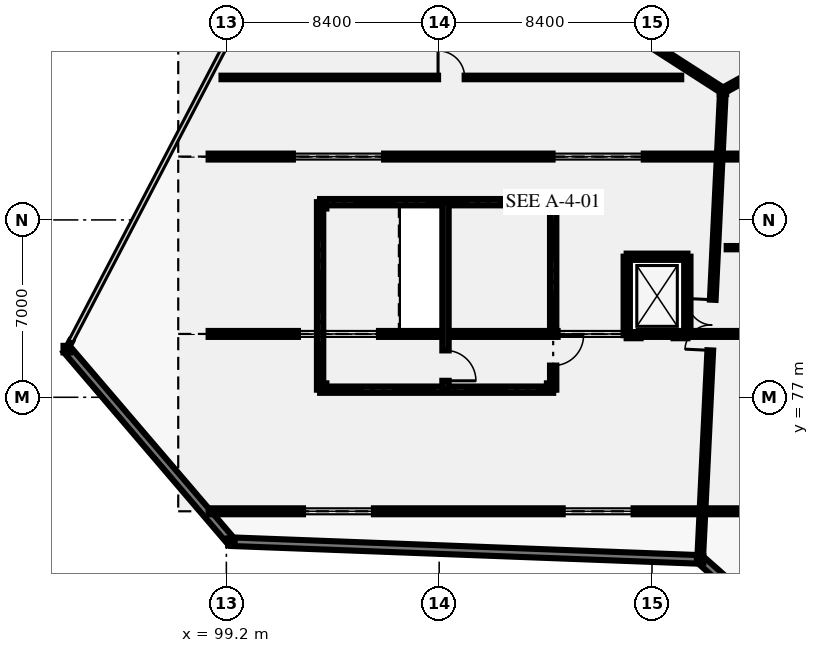
"""IFC4 building model, lengths in metres.
Left out: names, types, materials, properties, quantities, classifications, styles, units other than length and angle.
Written with IfcOpenShell. Run it as: python <this file> out.ifc"""

import sys

from ifc_helpers import new_model, si_unit, direction, frame, frame_2d, origin, origin_2d, place, context, subcontext, project, spatial, rectangle, i_section, extrude, element, fill, save


model = new_model("IFC4")
c1 = context("Model", 3, precision=1e-05, world=origin(), true_north=direction((0.0, 1.0)))
c2 = subcontext(c1, "Body", "Model", "MODEL_VIEW")
j1 = project(units=[si_unit("LENGTHUNIT", "METRE"), si_unit("PLANEANGLEUNIT", "RADIAN")], contexts=[c1])
p1 = place(None, origin())
s1 = spatial("IfcSite", under=j1, at=p1, CompositionType="ELEMENT")
p2 = place(p1, origin())
s2 = spatial("IfcBuilding", under=s1, at=p2, CompositionType="ELEMENT")
p3 = place(p2, frame((0.0, 0.0, 28.8)))
s3 = spatial("IfcBuildingStorey", under=s2, at=p3, CompositionType="ELEMENT", Elevation=28.8)
for number, where, z_axis, x_axis in (
    (1, (92.9, 78.9, 0.0), (0.0, 0.0, 1.0), (1.0, 0.0, 0.0)),
    (2, (99.4, 71.3, 0.0), (0.0, 0.0, 1.0), (1.0, 0.0, 0.0)),
    (3, (117.9, 70.6, 0.0), (0.0, 0.0, 1.0), (1.0, 0.0, 0.0)),
    (4, (118.8, 89.1, 0.0), (0.0, 0.0, 1.0), (1.0, 0.0, 0.0)),
    (5, (103.02, 77.42, 0.0), (0.0, 0.0, 1.0), (1.0, 0.0, 0.0)),
    (6, (111.98, 77.42, 0.0), (0.0, 0.0, 1.0), (1.0, 0.0, 0.0)),
    (7, (111.98, 84.58, 0.0), (0.0, 0.0, 1.0), (1.0, 0.0, 0.0)),
    (8, (103.02, 84.58, 0.0), (0.0, 0.0, 1.0), (1.0, 0.0, 0.0)),
):
    element("IfcColumn", number, at=place(p3, frame(where, z_axis=z_axis, x_axis=x_axis)), inside=s3, PredefinedType="COLUMN", context=c2, shape_type="SweptSolid", body=[
        extrude(i_section(OverallWidth=0.256, OverallDepth=0.26, WebThickness=0.01, FlangeThickness=0.017, FilletRadius=0.013, at=origin_2d()), origin(), (0.0, 0.0, 1.0), 6.6),
    ])
p4 = place(p3, frame((117.84, 70.602, 0.0), z_axis=(0.0, 0.0, 1.0), x_axis=(-0.999284381651, 0.037824920194, 0.0)))
e9 = element("IfcWall", 9, at=p4, inside=s3, PredefinedType="SOLIDWALL", context=c2, shape_type="SweptSolid", body=[
    extrude(rectangle(XDim=18.453, YDim=0.34, at=frame_2d((9.227, 0.0))), origin(), (0.0, 0.0, 1.0), 5.42),
])
p5 = place(p3, frame((92.919, 78.937, 0.0), z_axis=(0.0, 0.0, 1.0), x_axis=(0.464243799771, 0.885707454171, 0.0)))
e10 = element("IfcWall", 10, at=p5, inside=s3, PredefinedType="SOLIDWALL", context=c2, shape_type="SweptSolid", body=[
    extrude(rectangle(XDim=0.308, YDim=0.095, at=frame_2d((0.154, 0.0))), origin(), (0.0, 0.0, 1.0), 5.42),
])
p6 = place(p3, frame((99.4, 71.3, 0.0), z_axis=(0.0, 0.0, 1.0), x_axis=(-0.649974737731, 0.75995581471, 0.0)))
e11 = element("IfcWall", 11, at=p6, inside=s3, PredefinedType="SOLIDWALL", context=c2, shape_type="SweptSolid", body=[
    extrude(rectangle(XDim=10.0, YDim=0.34, at=frame_2d((5.0, 0.0))), origin(), (0.0, 0.0, 1.0), 5.42),
])
p7 = place(p3, frame((125.5, 63.9, 0.0), z_axis=(0.0, 0.0, 1.0), x_axis=(-0.750131359252, 0.661288850554, 0.0)))
e12 = element("IfcWall", 12, at=p7, inside=s3, PredefinedType="SOLIDWALL", context=c2, shape_type="SweptSolid", body=[
    extrude(rectangle(XDim=10.072, YDim=0.34, at=frame_2d((5.036, 0.0))), origin(), (0.0, 0.0, 1.0), 5.42),
])
p8 = place(p3, frame((139.5, 72.5, 6.25), z_axis=(0.0, 0.0, 1.0), x_axis=(-1.0, 0.0, 0.0)))
e13 = element("IfcWall", 13, at=p8, inside=s3, PredefinedType="SOLIDWALL", context=c2, shape_type="SweptSolid", body=[
    extrude(rectangle(XDim=41.0, YDim=0.235, at=frame_2d((20.5, 0.0))), origin(), (0.0, 0.0, 1.0), 3.73),
])
p9 = place(p8, frame((3.725, 0.0, 0.25)))
e14 = element("IfcOpeningElement", 14, at=p9, cuts=e13, PredefinedType="OPENING", context=c2, shape_type="SweptSolid", body=[
    extrude(rectangle(XDim=2.8, YDim=2.2, at=frame_2d((1.4, 1.1))), frame((0.0, 0.127, 0.0), z_axis=(0.0, -1.0, 0.0), x_axis=(1.0, 0.0, 0.0)), (0.0, 0.0, 1.0), 0.255),
])
p10 = place(p8, frame((13.975, 0.0, 0.25)))
e15 = element("IfcOpeningElement", 15, at=p10, cuts=e13, PredefinedType="OPENING", context=c2, shape_type="SweptSolid", body=[
    extrude(rectangle(XDim=2.8, YDim=2.2, at=frame_2d((1.4, 1.1))), frame((0.0, 0.127, 0.0), z_axis=(0.0, -1.0, 0.0), x_axis=(1.0, 0.0, 0.0)), (0.0, 0.0, 1.0), 0.255),
])
p11 = place(p8, frame((24.225, 0.0, 0.25)))
e16 = element("IfcOpeningElement", 16, at=p11, cuts=e13, PredefinedType="OPENING", context=c2, shape_type="SweptSolid", body=[
    extrude(rectangle(XDim=2.8, YDim=2.2, at=frame_2d((1.4, 1.1))), frame((0.0, 0.127, 0.0), z_axis=(0.0, -1.0, 0.0), x_axis=(1.0, 0.0, 0.0)), (0.0, 0.0, 1.0), 0.255),
])
p12 = place(p8, frame((34.475, 0.0, 0.25)))
e17 = element("IfcOpeningElement", 17, at=p12, cuts=e13, PredefinedType="OPENING", context=c2, shape_type="SweptSolid", body=[
    extrude(rectangle(XDim=2.8, YDim=2.2, at=frame_2d((1.4, 1.1))), frame((0.0, 0.127, 0.0), z_axis=(0.0, -1.0, 0.0), x_axis=(1.0, 0.0, 0.0)), (0.0, 0.0, 1.0), 0.255),
])
p13 = place(p3, frame((139.5, 79.5, 6.25), z_axis=(0.0, 0.0, 1.0), x_axis=(-1.0, 0.0, 0.0)))
e18 = element("IfcWall", 18, at=p13, inside=s3, PredefinedType="SOLIDWALL", context=c2, shape_type="SweptSolid", body=[
    extrude(rectangle(XDim=41.0, YDim=0.235, at=frame_2d((20.5, 0.0))), origin(), (0.0, 0.0, 1.0), 5.13),
])
p14 = place(p13, frame((4.675, 0.0, 0.25)))
e19 = element("IfcOpeningElement", 19, at=p14, cuts=e18, PredefinedType="OPENING", context=c2, shape_type="SweptSolid", body=[
    extrude(rectangle(XDim=3.2, YDim=2.4, at=frame_2d((1.6, 1.2))), frame((0.0, 0.127, 0.0), z_axis=(0.0, -1.0, 0.0), x_axis=(1.0, 0.0, 0.0)), (0.0, 0.0, 1.0), 0.255),
])
p15 = place(p13, frame((13.775, 0.0, 0.25)))
e20 = element("IfcOpeningElement", 20, at=p15, cuts=e18, PredefinedType="OPENING", context=c2, shape_type="SweptSolid", body=[
    extrude(rectangle(XDim=3.2, YDim=2.4, at=frame_2d((1.6, 1.2))), frame((0.0, 0.127, 0.0), z_axis=(0.0, -1.0, 0.0), x_axis=(1.0, 0.0, 0.0)), (0.0, 0.0, 1.0), 0.255),
])
p16 = place(p13, frame((24.025, 0.0, 0.25)))
e21 = element("IfcOpeningElement", 21, at=p16, cuts=e18, PredefinedType="OPENING", context=c2, shape_type="SweptSolid", body=[
    extrude(rectangle(XDim=3.2, YDim=2.4, at=frame_2d((1.6, 1.2))), frame((0.0, 0.127, 0.0), z_axis=(0.0, -1.0, 0.0), x_axis=(1.0, 0.0, 0.0)), (0.0, 0.0, 1.0), 0.255),
])
p17 = place(p13, frame((34.275, 0.0, 0.25)))
e22 = element("IfcOpeningElement", 22, at=p17, cuts=e18, PredefinedType="OPENING", context=c2, shape_type="SweptSolid", body=[
    extrude(rectangle(XDim=3.2, YDim=2.4, at=frame_2d((1.6, 1.2))), frame((0.0, 0.127, 0.0), z_axis=(0.0, -1.0, 0.0), x_axis=(1.0, 0.0, 0.0)), (0.0, 0.0, 1.0), 0.255),
])
p18 = place(p3, frame((139.5, 86.5, 6.25), z_axis=(0.0, 0.0, 1.0), x_axis=(-1.0, 0.0, 0.0)))
e23 = element("IfcWall", 23, at=p18, inside=s3, PredefinedType="SOLIDWALL", context=c2, shape_type="SweptSolid", body=[
    extrude(rectangle(XDim=41.0, YDim=0.235, at=frame_2d((20.5, 0.0))), origin(), (0.0, 0.0, 1.0), 5.13),
])
p19 = place(p18, frame((4.475, 0.0, 0.25)))
e24 = element("IfcOpeningElement", 24, at=p19, cuts=e23, PredefinedType="OPENING", context=c2, shape_type="SweptSolid", body=[
    extrude(rectangle(XDim=3.6, YDim=2.4, at=frame_2d((1.8, 1.2))), frame((0.0, 0.127, 0.0), z_axis=(0.0, -1.0, 0.0), x_axis=(1.0, 0.0, 0.0)), (0.0, 0.0, 1.0), 0.255),
])
p20 = place(p18, frame((13.575, 0.0, 0.25)))
e25 = element("IfcOpeningElement", 25, at=p20, cuts=e23, PredefinedType="OPENING", context=c2, shape_type="SweptSolid", body=[
    extrude(rectangle(XDim=3.6, YDim=2.4, at=frame_2d((1.8, 1.2))), frame((0.0, 0.127, 0.0), z_axis=(0.0, -1.0, 0.0), x_axis=(1.0, 0.0, 0.0)), (0.0, 0.0, 1.0), 0.255),
])
p21 = place(p18, frame((23.825, 0.0, 0.25)))
e26 = element("IfcOpeningElement", 26, at=p21, cuts=e23, PredefinedType="OPENING", context=c2, shape_type="SweptSolid", body=[
    extrude(rectangle(XDim=3.6, YDim=2.4, at=frame_2d((1.8, 1.2))), frame((0.0, 0.127, 0.0), z_axis=(0.0, -1.0, 0.0), x_axis=(1.0, 0.0, 0.0)), (0.0, 0.0, 1.0), 0.255),
])
p22 = place(p18, frame((34.075, 0.0, 0.25)))
e27 = element("IfcOpeningElement", 27, at=p22, cuts=e23, PredefinedType="OPENING", context=c2, shape_type="SweptSolid", body=[
    extrude(rectangle(XDim=3.6, YDim=2.4, at=frame_2d((1.8, 1.2))), frame((0.0, 0.127, 0.0), z_axis=(0.0, -1.0, 0.0), x_axis=(1.0, 0.0, 0.0)), (0.0, 0.0, 1.0), 0.255),
])
p23 = place(p3, frame((117.9, 70.6, 0.0), z_axis=(0.0, 0.0, 1.0), x_axis=(0.048599072515, 0.998818366947, 0.0)))
e28 = element("IfcWall", 28, at=p23, inside=s3, PredefinedType="SOLIDWALL", context=c2, shape_type="SweptSolid", body=[
    extrude(rectangle(XDim=18.522, YDim=0.225, at=frame_2d((9.261, 0.0))), origin(), (0.0, 0.0, 1.0), 5.82),
])
p24 = place(p23, frame((8.261, 0.0, 0.0)))
e29 = element("IfcOpeningElement", 29, at=p24, cuts=e28, PredefinedType="OPENING", context=c2, shape_type="SweptSolid", body=[
    extrude(rectangle(XDim=2.0, YDim=2.5, at=frame_2d((1.0, 1.25))), frame((0.0, 0.123, 0.0), z_axis=(0.0, -1.0, 0.0), x_axis=(1.0, 0.0, 0.0)), (0.0, 0.0, 1.0), 0.245),
])
p25 = place(p3, frame((118.8, 89.1, 0.0), z_axis=(0.0, 0.0, 1.0), x_axis=(-0.841183241423, 0.540750177392, 0.0)))
e30 = element("IfcWall", 30, at=p25, inside=s3, PredefinedType="SOLIDWALL", context=c2, shape_type="SweptSolid", body=[
    extrude(rectangle(XDim=18.308, YDim=0.225, at=frame_2d((9.154, 0.0))), origin(), (0.0, 0.0, 1.0), 5.82),
])
p26 = place(p25, frame((8.229, 0.0, 0.0)))
e31 = element("IfcOpeningElement", 31, at=p26, cuts=e30, PredefinedType="OPENING", context=c2, shape_type="SweptSolid", body=[
    extrude(rectangle(XDim=1.85, YDim=2.4, at=frame_2d((0.925, 1.2))), frame((0.0, 0.123, 0.0), z_axis=(0.0, -1.0, 0.0), x_axis=(1.0, 0.0, 0.0)), (0.0, 0.0, 1.0), 0.245),
])
p27 = place(p3, frame((134.9, 98.0, 0.0), z_axis=(0.0, 0.0, 1.0), x_axis=(-0.875181353329, -0.483794996652, 0.0)))
e32 = element("IfcWall", 32, at=p27, inside=s3, PredefinedType="SOLIDWALL", context=c2, shape_type="SweptSolid", body=[
    extrude(rectangle(XDim=18.396, YDim=0.225, at=frame_2d((9.198, 0.0))), origin(), (0.0, 0.0, 1.0), 5.82),
])
p28 = place(p27, frame((8.098, 0.0, 0.0)))
e33 = element("IfcOpeningElement", 33, at=p28, cuts=e32, PredefinedType="OPENING", context=c2, shape_type="SweptSolid", body=[
    extrude(rectangle(XDim=2.2, YDim=2.6, at=frame_2d((1.1, 1.3))), frame((0.0, 0.123, 0.0), z_axis=(0.0, -1.0, 0.0), x_axis=(1.0, 0.0, 0.0)), (0.0, 0.0, 1.0), 0.245),
])
p29 = place(p3, frame((99.009, 89.623, 0.0), z_axis=(0.0, 0.0, 1.0), x_axis=(1.0, 0.0, 0.0)))
e34 = element("IfcWall", 34, at=p29, inside=s3, PredefinedType="PARTITIONING", context=c2, shape_type="SweptSolid", body=[
    extrude(rectangle(XDim=18.145, YDim=0.14, at=frame_2d((9.073, 0.0))), origin(), (0.0, 0.0, 1.0), 5.12),
])
p30 = place(p29, frame((8.547, 0.0, 0.0)))
e35 = element("IfcOpeningElement", 35, at=p30, cuts=e34, PredefinedType="OPENING", context=c2, shape_type="SweptSolid", body=[
    extrude(rectangle(XDim=1.05, YDim=2.2, at=frame_2d((0.525, 1.1))), frame((0.0, 0.08, 0.0), z_axis=(0.0, -1.0, 0.0), x_axis=(1.0, 0.0, 0.0)), (0.0, 0.0, 1.0), 0.16),
])
p31 = place(p3, frame((118.949, 82.905, 0.0), z_axis=(0.0, 0.0, 1.0), x_axis=(1.0, 0.0, 0.0)))
e36 = element("IfcWall", 36, at=p31, inside=s3, PredefinedType="PARTITIONING", context=c2, shape_type="SweptSolid", body=[
    extrude(rectangle(XDim=3.251, YDim=0.13, at=frame_2d((1.625, 0.0))), origin(), (0.0, 0.0, 1.0), 5.12),
])
p32 = place(p31, frame((1.136, 0.0, 0.0)))
e37 = element("IfcOpeningElement", 37, at=p32, cuts=e36, PredefinedType="OPENING", context=c2, shape_type="SweptSolid", body=[
    extrude(rectangle(XDim=0.98, YDim=2.15, at=frame_2d((0.49, 1.075))), frame((0.0, 0.075, 0.0), z_axis=(0.0, -1.0, 0.0), x_axis=(1.0, 0.0, 0.0)), (0.0, 0.0, 1.0), 0.15),
])
p33 = place(p3, frame((102.9, 77.3, 0.0), z_axis=(0.0, 0.0, 1.0), x_axis=(0.0, 1.0, 0.0)))
e38 = element("IfcWall", 38, at=p33, inside=s3, PredefinedType="SHEAR", context=c2, shape_type="SweptSolid", body=[
    extrude(rectangle(XDim=7.4, YDim=0.25, at=frame_2d((3.7, 0.0))), origin(), (0.0, 0.0, 1.0), 6.36),
])
for number, where, z_axis, x_axis in (
    (39, (102.9, 84.7, 0.0), (0.0, 0.0, 1.0), (1.0, 0.0, 0.0)),
    (40, (112.1, 77.3, 0.0), (0.0, 0.0, 1.0), (-1.0, 0.0, 0.0)),
):
    element("IfcWall", number, at=place(p3, frame(where, z_axis=z_axis, x_axis=x_axis)), inside=s3, PredefinedType="SHEAR", context=c2, shape_type="SweptSolid", body=[
        extrude(rectangle(XDim=9.2, YDim=0.25, at=frame_2d((4.6, 0.0))), origin(), (0.0, 0.0, 1.0), 6.36),
    ])
p34 = place(p3, frame((112.1, 84.7, 0.0), z_axis=(0.0, 0.0, 1.0), x_axis=(0.0, -1.0, 0.0)))
e41 = element("IfcWall", 41, at=p34, inside=s3, PredefinedType="SHEAR", context=c2, shape_type="SweptSolid", body=[
    extrude(rectangle(XDim=7.4, YDim=0.25, at=frame_2d((3.7, 0.0))), origin(), (0.0, 0.0, 1.0), 6.36),
])
p35 = place(p34, frame((5.25, 0.0, 0.0)))
e42 = element("IfcOpeningElement", 42, at=p35, cuts=e41, PredefinedType="OPENING", context=c2, shape_type="SweptSolid", body=[
    extrude(rectangle(XDim=1.2, YDim=2.2, at=frame_2d((0.6, 1.1))), frame((0.0, 0.135, 0.0), z_axis=(0.0, -1.0, 0.0), x_axis=(1.0, 0.0, 0.0)), (0.0, 0.0, 1.0), 0.27),
])
p36 = place(p3, frame((107.85, 84.7, 0.0), z_axis=(0.0, 0.0, 1.0), x_axis=(0.0, -1.0, 0.0)))
e43 = element("IfcWall", 43, at=p36, inside=s3, PredefinedType="SHEAR", context=c2, shape_type="SweptSolid", body=[
    extrude(rectangle(XDim=7.4, YDim=0.25, at=frame_2d((3.7, 0.0))), origin(), (0.0, 0.0, 1.0), 6.36),
])
p37 = place(p36, frame((5.85, 0.0, 0.0)))
e44 = element("IfcOpeningElement", 44, at=p37, cuts=e43, PredefinedType="OPENING", context=c2, shape_type="SweptSolid", body=[
    extrude(rectangle(XDim=1.2, YDim=2.2, at=frame_2d((0.6, 1.1))), frame((0.0, 0.135, 0.0), z_axis=(0.0, -1.0, 0.0), x_axis=(1.0, 0.0, 0.0)), (0.0, 0.0, 1.0), 0.27),
])
p38 = place(p3, frame((115.0, 82.55, 0.0), z_axis=(0.0, 0.0, 1.0), x_axis=(1.0, 0.0, 0.0)))
e45 = element("IfcWall", 45, at=p38, inside=s3, PredefinedType="SHEAR", context=c2, shape_type="SweptSolid", body=[
    extrude(rectangle(XDim=2.4, YDim=0.24, at=frame_2d((1.2, 0.0))), origin(), (0.0, 0.0, 1.0), 6.2),
])
for number, where, z_axis, x_axis in (
    (46, (117.4, 82.55, 0.0), (0.0, 0.0, 1.0), (0.0, -1.0, 0.0)),
    (47, (115.0, 79.45, 0.0), (0.0, 0.0, 1.0), (0.0, 1.0, 0.0)),
):
    element("IfcWall", number, at=place(p3, frame(where, z_axis=z_axis, x_axis=x_axis)), inside=s3, PredefinedType="SHEAR", context=c2, shape_type="SweptSolid", body=[
        extrude(rectangle(XDim=3.1, YDim=0.24, at=frame_2d((1.55, 0.0))), origin(), (0.0, 0.0, 1.0), 6.2),
    ])
p39 = place(p3, frame((117.4, 79.45, 0.0), z_axis=(0.0, 0.0, 1.0), x_axis=(-1.0, 0.0, 0.0)))
e48 = element("IfcWall", 48, at=p39, inside=s3, PredefinedType="SHEAR", context=c2, shape_type="SweptSolid", body=[
    extrude(rectangle(XDim=2.4, YDim=0.24, at=frame_2d((1.2, 0.0))), origin(), (0.0, 0.0, 1.0), 6.2),
])
p40 = place(p39, frame((0.55, 0.0, 0.0)))
e49 = element("IfcOpeningElement", 49, at=p40, cuts=e48, PredefinedType="OPENING", context=c2, shape_type="SweptSolid", body=[
    extrude(rectangle(XDim=1.3, YDim=2.25, at=frame_2d((0.65, 1.125))), frame((0.0, 0.13, 0.0), z_axis=(0.0, -1.0, 0.0), x_axis=(1.0, 0.0, 0.0)), (0.0, 0.0, 1.0), 0.26),
])
p41 = place(p11, origin())
e50 = element("IfcWindow", 50, at=p41, inside=s3, PartitioningType="SINGLE_PANEL", PredefinedType="SKYLIGHT", context=c2, shape_type="SweptSolid", body=[
    extrude(rectangle(XDim=2.8, YDim=2.2, at=frame_2d((1.4, 1.1))), frame((0.0, 0.03, 0.0), z_axis=(0.0, -1.0, 0.0), x_axis=(1.0, 0.0, 0.0)), (0.0, 0.0, 1.0), 0.06),
])
fill(e16, e50)
p42 = place(p12, origin())
e51 = element("IfcWindow", 51, at=p42, inside=s3, PartitioningType="SINGLE_PANEL", PredefinedType="SKYLIGHT", context=c2, shape_type="SweptSolid", body=[
    extrude(rectangle(XDim=2.8, YDim=2.2, at=frame_2d((1.4, 1.1))), frame((0.0, 0.03, 0.0), z_axis=(0.0, -1.0, 0.0), x_axis=(1.0, 0.0, 0.0)), (0.0, 0.0, 1.0), 0.06),
])
fill(e17, e51)
p43 = place(p16, origin())
e52 = element("IfcWindow", 52, at=p43, inside=s3, PartitioningType="SINGLE_PANEL", PredefinedType="SKYLIGHT", context=c2, shape_type="SweptSolid", body=[
    extrude(rectangle(XDim=3.2, YDim=2.4, at=frame_2d((1.6, 1.2))), frame((0.0, 0.03, 0.0), z_axis=(0.0, -1.0, 0.0), x_axis=(1.0, 0.0, 0.0)), (0.0, 0.0, 1.0), 0.06),
])
fill(e21, e52)
p44 = place(p17, origin())
e53 = element("IfcWindow", 53, at=p44, inside=s3, PartitioningType="SINGLE_PANEL", PredefinedType="SKYLIGHT", context=c2, shape_type="SweptSolid", body=[
    extrude(rectangle(XDim=3.2, YDim=2.4, at=frame_2d((1.6, 1.2))), frame((0.0, 0.03, 0.0), z_axis=(0.0, -1.0, 0.0), x_axis=(1.0, 0.0, 0.0)), (0.0, 0.0, 1.0), 0.06),
])
fill(e22, e53)
p45 = place(p21, origin())
e54 = element("IfcWindow", 54, at=p45, inside=s3, PartitioningType="SINGLE_PANEL", PredefinedType="SKYLIGHT", context=c2, shape_type="SweptSolid", body=[
    extrude(rectangle(XDim=3.6, YDim=2.4, at=frame_2d((1.8, 1.2))), frame((0.0, 0.03, 0.0), z_axis=(0.0, -1.0, 0.0), x_axis=(1.0, 0.0, 0.0)), (0.0, 0.0, 1.0), 0.06),
])
fill(e26, e54)
p46 = place(p22, origin())
e55 = element("IfcWindow", 55, at=p46, inside=s3, PartitioningType="SINGLE_PANEL", PredefinedType="SKYLIGHT", context=c2, shape_type="SweptSolid", body=[
    extrude(rectangle(XDim=3.6, YDim=2.4, at=frame_2d((1.8, 1.2))), frame((0.0, 0.03, 0.0), z_axis=(0.0, -1.0, 0.0), x_axis=(1.0, 0.0, 0.0)), (0.0, 0.0, 1.0), 0.06),
])
fill(e27, e55)
p47 = place(p24, origin())
e56 = element("IfcDoor", 56, at=p47, inside=s3, OperationType="DOUBLE_DOOR_SINGLE_SWING", PredefinedType="DOOR", context=c2, shape_type="SweptSolid", body=[
    extrude(rectangle(XDim=2.0, YDim=2.5, at=frame_2d((1.0, 1.25))), frame((0.0, 0.025, 0.0), z_axis=(0.0, -1.0, 0.0), x_axis=(1.0, 0.0, 0.0)), (0.0, 0.0, 1.0), 0.05),
])
fill(e29, e56)
p48 = place(p30, origin())
e57 = element("IfcDoor", 57, at=p48, inside=s3, OperationType="SINGLE_SWING_LEFT", PredefinedType="DOOR", context=c2, shape_type="SweptSolid", body=[
    extrude(rectangle(XDim=1.05, YDim=2.2, at=frame_2d((0.525, 1.1))), frame((0.0, 0.025, 0.0), z_axis=(0.0, -1.0, 0.0), x_axis=(1.0, 0.0, 0.0)), (0.0, 0.0, 1.0), 0.05),
])
fill(e35, e57)
p49 = place(p35, origin())
e58 = element("IfcDoor", 58, at=p49, inside=s3, OperationType="SINGLE_SWING_LEFT", PredefinedType="DOOR", context=c2, shape_type="SweptSolid", body=[
    extrude(rectangle(XDim=1.2, YDim=2.2, at=frame_2d((0.6, 1.1))), frame((0.0, 0.025, 0.0), z_axis=(0.0, -1.0, 0.0), x_axis=(1.0, 0.0, 0.0)), (0.0, 0.0, 1.0), 0.05),
])
fill(e42, e58)
p50 = place(p37, origin())
e59 = element("IfcDoor", 59, at=p50, inside=s3, OperationType="SINGLE_SWING_RIGHT", PredefinedType="DOOR", context=c2, shape_type="SweptSolid", body=[
    extrude(rectangle(XDim=1.2, YDim=2.2, at=frame_2d((0.6, 1.1))), frame((0.0, 0.025, 0.0), z_axis=(0.0, -1.0, 0.0), x_axis=(1.0, 0.0, 0.0)), (0.0, 0.0, 1.0), 0.05),
])
fill(e44, e59)
p51 = place(p40, origin())
e60 = element("IfcDoor", 60, at=p51, inside=s3, OperationType="SLIDING_TO_LEFT", PredefinedType="DOOR", context=c2, shape_type="SweptSolid", body=[
    extrude(rectangle(XDim=1.3, YDim=2.25, at=frame_2d((0.65, 1.125))), frame((0.0, 0.025, 0.0), z_axis=(0.0, -1.0, 0.0), x_axis=(1.0, 0.0, 0.0)), (0.0, 0.0, 1.0), 0.05),
])
fill(e49, e60)
save(model, sys.argv[1])
